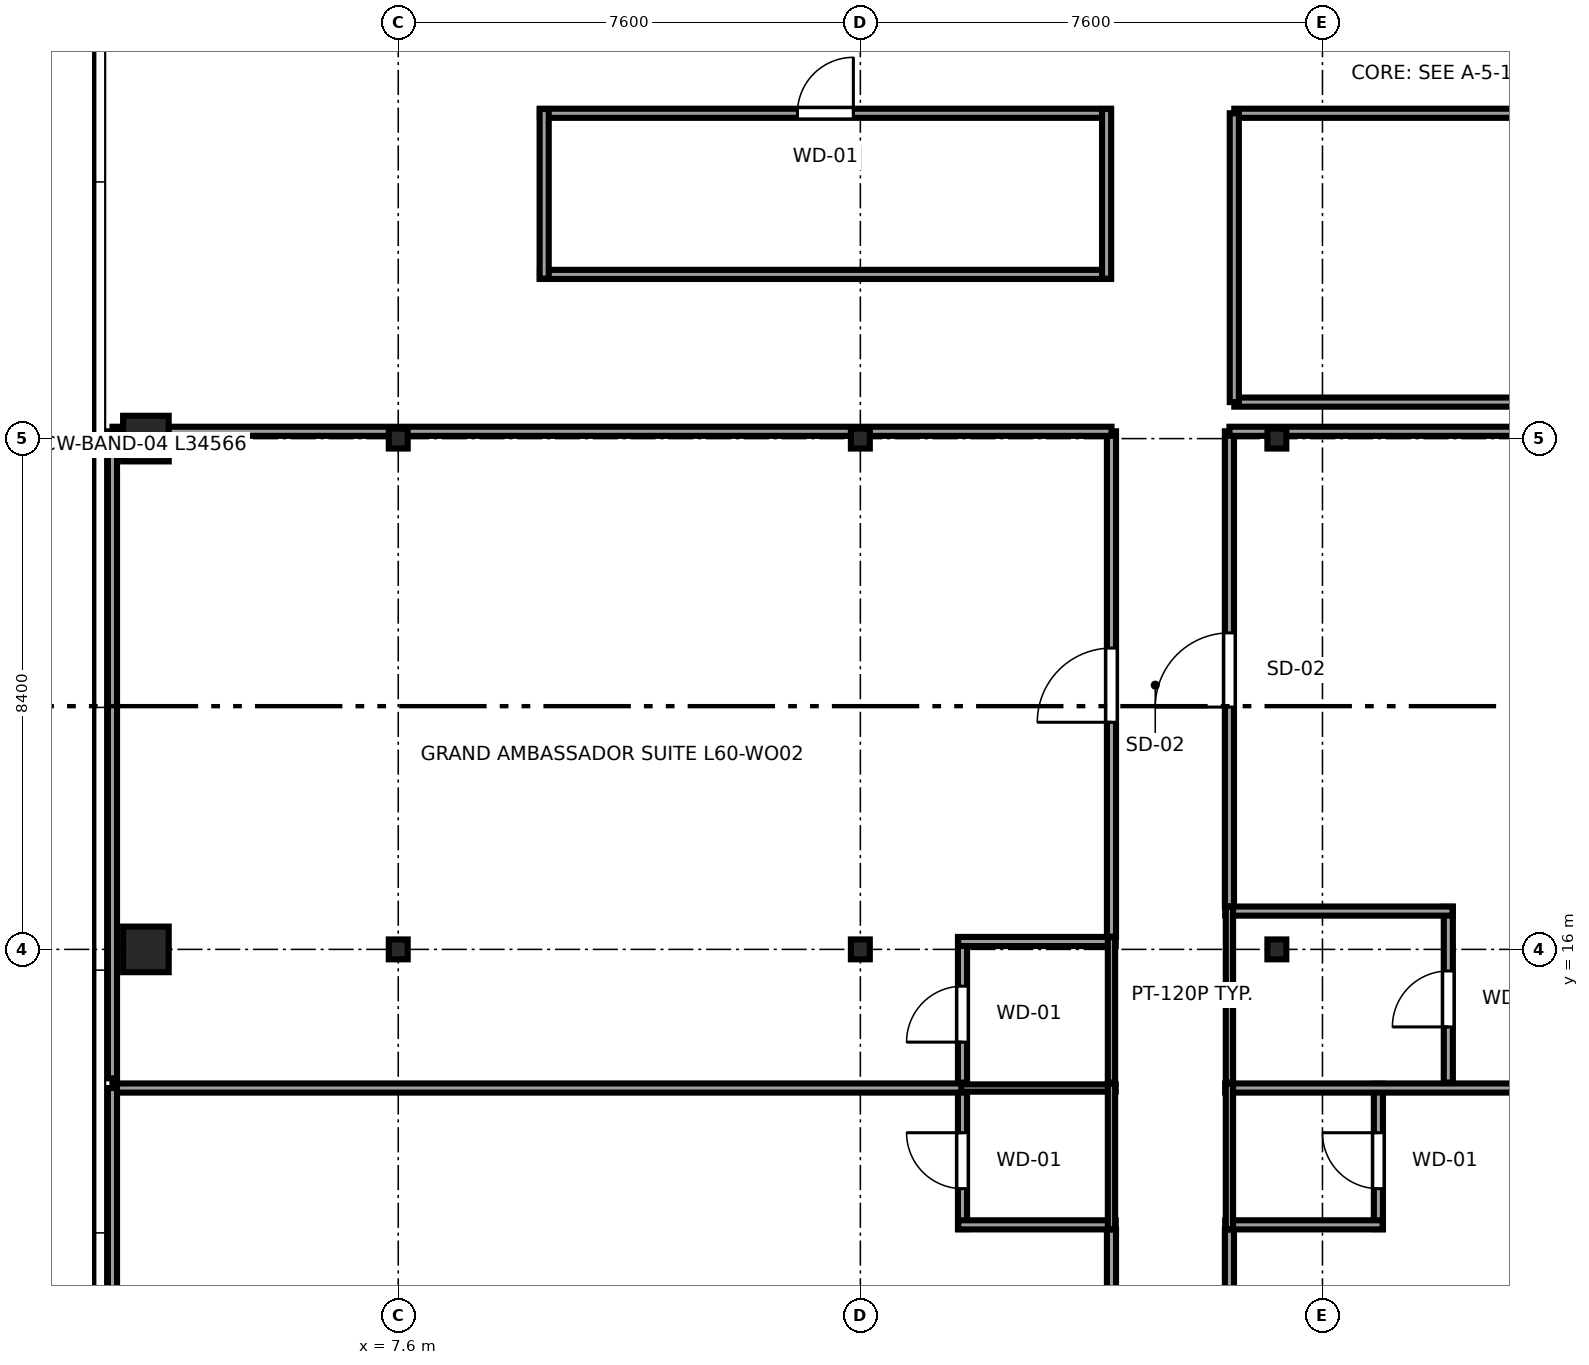
"""IFC4 building model, lengths in metres.
Left out: names, types, materials, properties, quantities, classifications, styles, units other than length and angle.
Written with IfcOpenShell. Run it as: python <this file> out.ifc"""

import sys

from ifc_helpers import new_model, si_unit, direction, frame, frame_2d, origin, origin_2d, place, context, subcontext, project, spatial, rectangle, i_section, extrude, source, transform, mapped, element, fill, save


model = new_model("IFC4")
c1 = context("Model", 3, precision=1e-05, world=origin(), true_north=direction((0.0, 1.0)))
c2 = subcontext(c1, "Body", "Model", "MODEL_VIEW")
j1 = project(units=[si_unit("LENGTHUNIT", "METRE"), si_unit("PLANEANGLEUNIT", "RADIAN")], contexts=[c1])
p1 = place(None, origin())
s1 = spatial("IfcSite", under=j1, at=p1, CompositionType="ELEMENT")
p2 = place(p1, origin())
s2 = spatial("IfcBuilding", under=s1, at=p2, CompositionType="ELEMENT")
p3 = place(p2, frame((0.0, 0.0, 227.45)))
s3 = spatial("IfcBuildingStorey", under=s2, at=p3, CompositionType="ELEMENT", Elevation=227.45)
m1 = source(origin(), c2, "Body", "SweptSolid", [
    extrude(rectangle(XDim=0.75, YDim=0.75, at=origin_2d()), origin(), (0.0, 0.0, 1.0), 3.55),
])
for number, where, z_axis, x_axis in (
    (1, (3.45, 16.0, 0.0), (0.0, 0.0, 1.0), (1.0, 0.0, 0.0)),
    (2, (3.45, 24.4, 0.0), (0.0, 0.0, 1.0), (1.0, 0.0, 0.0)),
):
    element("IfcColumn", number, at=place(p3, frame(where, z_axis=z_axis, x_axis=x_axis)), inside=s3, PredefinedType="COLUMN", context=c2, shape_type="MappedRepresentation", body=[
        mapped(m1, transform((0.0, 0.0, 0.0), x_axis=(1.0, 0.0, 0.0), y_axis=(0.0, 1.0, 0.0), z_axis=(0.0, 0.0, 1.0), scale=1.0)),
    ])
m2 = source(origin(), c2, "Body", "SweptSolid", [
    extrude(i_section(OverallWidth=0.311, OverallDepth=0.327, WebThickness=0.016, FlangeThickness=0.025, FilletRadius=0.017, at=origin_2d()), origin(), (0.0, 0.0, 1.0), 3.55),
])
for number, where, z_axis, x_axis in (
    (3, (7.6, 16.0, 0.0), (0.0, 0.0, 1.0), (1.0, 0.0, 0.0)),
    (4, (7.6, 24.4, 0.0), (0.0, 0.0, 1.0), (1.0, 0.0, 0.0)),
    (5, (15.2, 16.0, 0.0), (0.0, 0.0, 1.0), (1.0, 0.0, 0.0)),
    (6, (15.2, 24.4, 0.0), (0.0, 0.0, 1.0), (1.0, 0.0, 0.0)),
    (7, (22.05, 16.0, 0.0), (0.0, 0.0, 1.0), (1.0, 0.0, 0.0)),
    (8, (22.05, 24.4, 0.0), (0.0, 0.0, 1.0), (1.0, 0.0, 0.0)),
):
    element("IfcColumn", number, at=place(p3, frame(where, z_axis=z_axis, x_axis=x_axis)), inside=s3, PredefinedType="COLUMN", context=c2, shape_type="MappedRepresentation", body=[
        mapped(m2, transform((0.0, 0.0, 0.0), x_axis=(1.0, 0.0, 0.0), y_axis=(0.0, 1.0, 0.0), z_axis=(0.0, 0.0, 1.0), scale=1.0)),
    ])
p4 = place(p3, frame((16.88, 11.4, 0.0), z_axis=(0.0, 0.0, 1.0), x_axis=(0.0, 1.0, 0.0)))
e9 = element("IfcWall", 9, at=p4, inside=s3, PredefinedType="PARTITIONING", context=c2, shape_type="SweptSolid", body=[
    extrude(rectangle(XDim=2.39, YDim=0.15, at=frame_2d((1.195, 0.0))), origin(), (0.0, 0.0, 1.0), 3.37),
])
p5 = place(p4, frame((0.665, 0.0, 0.0)))
e10 = element("IfcOpeningElement", 10, at=p5, cuts=e9, PredefinedType="OPENING", context=c2, shape_type="SweptSolid", body=[
    extrude(rectangle(XDim=0.92, YDim=2.01, at=frame_2d((0.46, 1.005))), frame((0.0, 0.085, 0.0), z_axis=(0.0, -1.0, 0.0), x_axis=(1.0, 0.0, 0.0)), (0.0, 0.0, 1.0), 0.17),
])
p6 = place(p3, frame((16.81, 11.47, 0.0), z_axis=(0.0, 0.0, 1.0), x_axis=(1.0, 0.0, 0.0)))
e11 = element("IfcWall", 11, at=p6, inside=s3, PredefinedType="PARTITIONING", context=c2, shape_type="SweptSolid", body=[
    extrude(rectangle(XDim=2.59, YDim=0.15, at=frame_2d((1.295, 0.0))), origin(), (0.0, 0.0, 1.0), 3.37),
])
p7 = place(p3, frame((16.81, 13.72, 0.0), z_axis=(0.0, 0.0, 1.0), x_axis=(1.0, 0.0, 0.0)))
e12 = element("IfcWall", 12, at=p7, inside=s3, PredefinedType="PLUMBINGWALL", context=c2, shape_type="SweptSolid", body=[
    extrude(rectangle(XDim=2.59, YDim=0.12, at=frame_2d((1.295, 0.0))), origin(), (0.0, 0.0, 1.0), 3.37),
])
p8 = place(p3, frame((19.33, 11.4, 0.0), z_axis=(0.0, 0.0, 1.0), x_axis=(0.0, 1.0, 0.0)))
e13 = element("IfcWall", 13, at=p8, inside=s3, PredefinedType="PLUMBINGWALL", context=c2, shape_type="SweptSolid", body=[
    extrude(rectangle(XDim=2.39, YDim=0.12, at=frame_2d((1.195, 0.0))), origin(), (0.0, 0.0, 1.0), 3.37),
])
p9 = place(p3, frame((16.88, 13.81, 0.0), z_axis=(0.0, 0.0, 1.0), x_axis=(0.0, 1.0, 0.0)))
e14 = element("IfcWall", 14, at=p9, inside=s3, PredefinedType="PARTITIONING", context=c2, shape_type="SweptSolid", body=[
    extrude(rectangle(XDim=2.39, YDim=0.15, at=frame_2d((1.195, 0.0))), origin(), (0.0, 0.0, 1.0), 3.37),
])
p10 = place(p9, frame((0.665, 0.0, 0.0)))
e15 = element("IfcOpeningElement", 15, at=p10, cuts=e14, PredefinedType="OPENING", context=c2, shape_type="SweptSolid", body=[
    extrude(rectangle(XDim=0.92, YDim=2.01, at=frame_2d((0.46, 1.005))), frame((0.0, 0.085, 0.0), z_axis=(0.0, -1.0, 0.0), x_axis=(1.0, 0.0, 0.0)), (0.0, 0.0, 1.0), 0.17),
])
p11 = place(p3, frame((16.81, 16.13, 0.0), z_axis=(0.0, 0.0, 1.0), x_axis=(1.0, 0.0, 0.0)))
e16 = element("IfcWall", 16, at=p11, inside=s3, PredefinedType="PARTITIONING", context=c2, shape_type="SweptSolid", body=[
    extrude(rectangle(XDim=2.59, YDim=0.15, at=frame_2d((1.295, 0.0))), origin(), (0.0, 0.0, 1.0), 2.758),
])
p12 = place(p3, frame((19.33, 13.81, 0.0), z_axis=(0.0, 0.0, 1.0), x_axis=(0.0, 1.0, 0.0)))
e17 = element("IfcWall", 17, at=p12, inside=s3, PredefinedType="PLUMBINGWALL", context=c2, shape_type="SweptSolid", body=[
    extrude(rectangle(XDim=2.39, YDim=0.12, at=frame_2d((1.195, 0.0))), origin(), (0.0, 0.0, 1.0), 3.37),
])
p13 = place(p3, frame((23.72, 11.4, 0.0), z_axis=(0.0, 0.0, 1.0), x_axis=(0.0, 1.0, 0.0)))
e18 = element("IfcWall", 18, at=p13, inside=s3, PredefinedType="PARTITIONING", context=c2, shape_type="SweptSolid", body=[
    extrude(rectangle(XDim=2.39, YDim=0.15, at=frame_2d((1.195, 0.0))), origin(), (0.0, 0.0, 1.0), 3.37),
])
p14 = place(p13, frame((0.665, 0.0, 0.0)))
e19 = element("IfcOpeningElement", 19, at=p14, cuts=e18, PredefinedType="OPENING", context=c2, shape_type="SweptSolid", body=[
    extrude(rectangle(XDim=0.92, YDim=2.01, at=frame_2d((0.46, 1.005))), frame((0.0, 0.085, 0.0), z_axis=(0.0, -1.0, 0.0), x_axis=(1.0, 0.0, 0.0)), (0.0, 0.0, 1.0), 0.17),
])
p15 = place(p3, frame((21.2, 11.47, 0.0), z_axis=(0.0, 0.0, 1.0), x_axis=(1.0, 0.0, 0.0)))
e20 = element("IfcWall", 20, at=p15, inside=s3, PredefinedType="PARTITIONING", context=c2, shape_type="SweptSolid", body=[
    extrude(rectangle(XDim=2.59, YDim=0.15, at=frame_2d((1.295, 0.0))), origin(), (0.0, 0.0, 1.0), 3.37),
])
p16 = place(p3, frame((21.2, 13.72, 0.0), z_axis=(0.0, 0.0, 1.0), x_axis=(1.0, 0.0, 0.0)))
e21 = element("IfcWall", 21, at=p16, inside=s3, PredefinedType="PARTITIONING", context=c2, shape_type="SweptSolid", body=[
    extrude(rectangle(XDim=18.195, YDim=0.15, at=frame_2d((9.098, 0.0))), origin(), (0.0, 0.0, 1.0), 3.37),
])
p17 = place(p3, frame((21.27, 11.4, 0.0), z_axis=(0.0, 0.0, 1.0), x_axis=(0.0, 1.0, 0.0)))
e22 = element("IfcWall", 22, at=p17, inside=s3, PredefinedType="PLUMBINGWALL", context=c2, shape_type="SweptSolid", body=[
    extrude(rectangle(XDim=2.39, YDim=0.12, at=frame_2d((1.195, 0.0))), origin(), (0.0, 0.0, 1.0), 3.37),
])
p18 = place(p3, frame((24.87, 13.81, 0.0), z_axis=(0.0, 0.0, 1.0), x_axis=(0.0, 1.0, 0.0)))
e23 = element("IfcWall", 23, at=p18, inside=s3, PredefinedType="PARTITIONING", context=c2, shape_type="SweptSolid", body=[
    extrude(rectangle(XDim=2.89, YDim=0.15, at=frame_2d((1.445, 0.0))), origin(), (0.0, 0.0, 1.0), 3.37),
])
p19 = place(p18, frame((0.915, 0.0, 0.0)))
e24 = element("IfcOpeningElement", 24, at=p19, cuts=e23, PredefinedType="OPENING", context=c2, shape_type="SweptSolid", body=[
    extrude(rectangle(XDim=0.92, YDim=2.01, at=frame_2d((0.46, 1.005))), frame((0.0, 0.085, 0.0), z_axis=(0.0, -1.0, 0.0), x_axis=(1.0, 0.0, 0.0)), (0.0, 0.0, 1.0), 0.17),
])
p20 = place(p3, frame((21.2, 16.63, 0.0), z_axis=(0.0, 0.0, 1.0), x_axis=(1.0, 0.0, 0.0)))
e25 = element("IfcWall", 25, at=p20, inside=s3, PredefinedType="PARTITIONING", context=c2, shape_type="SweptSolid", body=[
    extrude(rectangle(XDim=3.74, YDim=0.15, at=frame_2d((1.87, 0.0))), origin(), (0.0, 0.0, 1.0), 3.37),
])
p21 = place(p3, frame((21.27, 13.81, 0.0), z_axis=(0.0, 0.0, 1.0), x_axis=(0.0, 1.0, 0.0)))
e26 = element("IfcWall", 26, at=p21, inside=s3, PredefinedType="PLUMBINGWALL", context=c2, shape_type="SweptSolid", body=[
    extrude(rectangle(XDim=2.89, YDim=0.12, at=frame_2d((1.445, 0.0))), origin(), (0.0, 0.0, 1.0), 3.37),
])
p22 = place(p3, frame((19.33, 3.005, 0.0), z_axis=(0.0, 0.0, 1.0), x_axis=(0.0, 1.0, 0.0)))
e27 = element("IfcWall", 27, at=p22, inside=s3, PredefinedType="PARTITIONING", context=c2, shape_type="SweptSolid", body=[
    extrude(rectangle(XDim=8.385, YDim=0.15, at=frame_2d((4.192, 0.0))), origin(), (0.0, 0.0, 1.0), 3.37),
])
p23 = place(p22, frame((3.59, 0.0, 0.0)))
e28 = element("IfcOpeningElement", 28, at=p23, cuts=e27, PredefinedType="OPENING", context=c2, shape_type="SweptSolid", body=[
    extrude(rectangle(XDim=1.22, YDim=2.08, at=frame_2d((0.61, 1.04))), frame((0.0, 0.085, 0.0), z_axis=(0.0, -1.0, 0.0), x_axis=(1.0, 0.0, 0.0)), (0.0, 0.0, 1.0), 0.17),
])
p24 = place(p3, frame((2.9, 13.72, 0.0), z_axis=(0.0, 0.0, 1.0), x_axis=(1.0, 0.0, 0.0)))
e29 = element("IfcWall", 29, at=p24, inside=s3, PredefinedType="PARTITIONING", context=c2, shape_type="SweptSolid", body=[
    extrude(rectangle(XDim=13.96, YDim=0.15, at=frame_2d((6.98, 0.0))), origin(), (0.0, 0.0, 1.0), 3.37),
])
p25 = place(p3, frame((2.9, 7.042, 0.0), z_axis=(0.0, 0.0, 1.0), x_axis=(0.0, 1.0, 0.0)))
e30 = element("IfcWall", 30, at=p25, inside=s3, PredefinedType="PARTITIONING", context=c2, shape_type="SweptSolid", body=[
    extrude(rectangle(XDim=6.678, YDim=0.15, at=frame_2d((3.339, 0.0))), origin(), (0.0, 0.0, 1.0), 3.37),
])
p26 = place(p3, frame((19.33, 16.21, 0.0), z_axis=(0.0, 0.0, 1.0), x_axis=(0.0, 1.0, 0.0)))
e31 = element("IfcWall", 31, at=p26, inside=s3, PredefinedType="PARTITIONING", context=c2, shape_type="SweptSolid", body=[
    extrude(rectangle(XDim=8.31, YDim=0.15, at=frame_2d((4.155, 0.0))), origin(), (0.0, 0.0, 1.0), 3.37),
])
p27 = place(p26, frame((3.525, 0.0, 0.0)))
e32 = element("IfcOpeningElement", 32, at=p27, cuts=e31, PredefinedType="OPENING", context=c2, shape_type="SweptSolid", body=[
    extrude(rectangle(XDim=1.22, YDim=2.08, at=frame_2d((0.61, 1.04))), frame((0.0, 0.085, 0.0), z_axis=(0.0, -1.0, 0.0), x_axis=(1.0, 0.0, 0.0)), (0.0, 0.0, 1.0), 0.17),
])
p28 = place(p3, frame((2.9, 24.52, 0.0), z_axis=(0.0, 0.0, 1.0), x_axis=(1.0, 0.0, 0.0)))
e33 = element("IfcWall", 33, at=p28, inside=s3, PredefinedType="PARTITIONING", context=c2, shape_type="SweptSolid", body=[
    extrude(rectangle(XDim=16.43, YDim=0.15, at=frame_2d((8.215, 0.0))), origin(), (0.0, 0.0, 1.0), 2.758),
])
p29 = place(p3, frame((2.9, 13.88, 0.0), z_axis=(0.0, 0.0, 1.0), x_axis=(0.0, 1.0, 0.0)))
e34 = element("IfcWall", 34, at=p29, inside=s3, PredefinedType="PARTITIONING", context=c2, shape_type="SweptSolid", body=[
    extrude(rectangle(XDim=10.64, YDim=0.15, at=frame_2d((5.32, 0.0))), origin(), (0.0, 0.0, 1.0), 3.37),
])
p30 = place(p3, frame((21.27, 3.005, 0.0), z_axis=(0.0, 0.0, 1.0), x_axis=(0.0, 1.0, 0.0)))
e35 = element("IfcWall", 35, at=p30, inside=s3, PredefinedType="PARTITIONING", context=c2, shape_type="SweptSolid", body=[
    extrude(rectangle(XDim=8.385, YDim=0.15, at=frame_2d((4.192, 0.0))), origin(), (0.0, 0.0, 1.0), 3.37),
])
p31 = place(p30, frame((2.64, 0.0, 0.0)))
e36 = element("IfcOpeningElement", 36, at=p31, cuts=e35, PredefinedType="OPENING", context=c2, shape_type="SweptSolid", body=[
    extrude(rectangle(XDim=1.22, YDim=2.08, at=frame_2d((0.61, 1.04))), frame((0.0, 0.085, 0.0), z_axis=(0.0, -1.0, 0.0), x_axis=(1.0, 0.0, 0.0)), (0.0, 0.0, 1.0), 0.17),
])
p32 = place(p3, frame((21.27, 16.71, 0.0), z_axis=(0.0, 0.0, 1.0), x_axis=(0.0, 1.0, 0.0)))
e37 = element("IfcWall", 37, at=p32, inside=s3, PredefinedType="PARTITIONING", context=c2, shape_type="SweptSolid", body=[
    extrude(rectangle(XDim=7.81, YDim=0.15, at=frame_2d((3.905, 0.0))), origin(), (0.0, 0.0, 1.0), 3.37),
])
p33 = place(p32, frame((3.275, 0.0, 0.0)))
e38 = element("IfcOpeningElement", 38, at=p33, cuts=e37, PredefinedType="OPENING", context=c2, shape_type="SweptSolid", body=[
    extrude(rectangle(XDim=1.22, YDim=2.08, at=frame_2d((0.61, 1.04))), frame((0.0, 0.085, 0.0), z_axis=(0.0, -1.0, 0.0), x_axis=(1.0, 0.0, 0.0)), (0.0, 0.0, 1.0), 0.17),
])
p34 = place(p3, frame((21.27, 24.52, 0.0), z_axis=(0.0, 0.0, 1.0), x_axis=(1.0, 0.0, 0.0)))
e39 = element("IfcWall", 39, at=p34, inside=s3, PredefinedType="PARTITIONING", context=c2, shape_type="SweptSolid", body=[
    extrude(rectangle(XDim=18.125, YDim=0.15, at=frame_2d((9.062, 0.0))), origin(), (0.0, 0.0, 1.0), 2.758),
])
p35 = place(p3, frame((9.93, 27.1, 0.0), z_axis=(0.0, 0.0, 1.0), x_axis=(1.0, 0.0, 0.0)))
e40 = element("IfcWall", 40, at=p35, inside=s3, PredefinedType="PARTITIONING", context=c2, shape_type="SweptSolid", body=[
    extrude(rectangle(XDim=9.39, YDim=0.15, at=frame_2d((4.695, 0.0))), origin(), (0.0, 0.0, 1.0), 3.37),
])
p36 = place(p3, frame((9.93, 29.75, 0.0), z_axis=(0.0, 0.0, 1.0), x_axis=(1.0, 0.0, 0.0)))
e41 = element("IfcWall", 41, at=p36, inside=s3, PredefinedType="PARTITIONING", context=c2, shape_type="SweptSolid", body=[
    extrude(rectangle(XDim=9.39, YDim=0.15, at=frame_2d((4.695, 0.0))), origin(), (0.0, 0.0, 1.0), 3.37),
])
p37 = place(p36, frame((4.235, 0.0, 0.0)))
e42 = element("IfcOpeningElement", 42, at=p37, cuts=e41, PredefinedType="OPENING", context=c2, shape_type="SweptSolid", body=[
    extrude(rectangle(XDim=0.92, YDim=2.01, at=frame_2d((0.46, 1.005))), frame((0.0, 0.085, 0.0), z_axis=(0.0, -1.0, 0.0), x_axis=(1.0, 0.0, 0.0)), (0.0, 0.0, 1.0), 0.17),
])
for number, where, z_axis, x_axis in (
    (43, (10.0, 27.03, 0.0), (0.0, 0.0, 1.0), (0.0, 1.0, 0.0)),
    (44, (19.25, 27.03, 0.0), (0.0, 0.0, 1.0), (0.0, 1.0, 0.0)),
):
    element("IfcWall", number, at=place(p3, frame(where, z_axis=z_axis, x_axis=x_axis)), inside=s3, PredefinedType="PARTITIONING", context=c2, shape_type="SweptSolid", body=[
        extrude(rectangle(XDim=2.79, YDim=0.15, at=frame_2d((1.395, 0.0))), origin(), (0.0, 0.0, 1.0), 3.37),
    ])
p38 = place(p3, frame((21.35, 25.0, 0.0), z_axis=(0.0, 0.0, 1.0), x_axis=(1.0, 0.0, 0.0)))
e45 = element("IfcWall", 45, at=p38, inside=s3, PredefinedType="PARTITIONING", context=c2, shape_type="SweptSolid", body=[
    extrude(rectangle(XDim=14.45, YDim=0.15, at=frame_2d((7.225, 0.0))), origin(), (0.0, 0.0, 1.0), 3.37),
])
p39 = place(p3, frame((21.35, 29.75, 0.0), z_axis=(0.0, 0.0, 1.0), x_axis=(1.0, 0.0, 0.0)))
e46 = element("IfcWall", 46, at=p39, inside=s3, PredefinedType="PARTITIONING", context=c2, shape_type="SweptSolid", body=[
    extrude(rectangle(XDim=14.45, YDim=0.15, at=frame_2d((7.225, 0.0))), origin(), (0.0, 0.0, 1.0), 3.37),
])
p40 = place(p39, frame((6.4, 0.0, 0.0)))
e47 = element("IfcOpeningElement", 47, at=p40, cuts=e46, PredefinedType="OPENING", context=c2, shape_type="SweptSolid", body=[
    extrude(rectangle(XDim=1.65, YDim=2.15, at=frame_2d((0.825, 1.075))), frame((0.0, 0.085, 0.0), z_axis=(0.0, -1.0, 0.0), x_axis=(1.0, 0.0, 0.0)), (0.0, 0.0, 1.0), 0.17),
])
p41 = place(p3, frame((21.35, 25.0, 0.0), z_axis=(0.0, 0.0, 1.0), x_axis=(0.0, 1.0, 0.0)))
e48 = element("IfcWall", 48, at=p41, inside=s3, PredefinedType="PARTITIONING", context=c2, shape_type="SweptSolid", body=[
    extrude(rectangle(XDim=4.75, YDim=0.15, at=frame_2d((2.375, 0.0))), origin(), (0.0, 0.0, 1.0), 3.37),
])
m3 = source(origin(), c2, "Body", "SweptSolid", [
    extrude(rectangle(XDim=0.92, YDim=2.01, at=frame_2d((0.46, 1.005))), frame((0.0, 0.025, 0.0), z_axis=(0.0, -1.0, 0.0), x_axis=(1.0, 0.0, 0.0)), (0.0, 0.0, 1.0), 0.05),
])
p42 = place(p5, origin())
e49 = element("IfcDoor", 49, at=p42, inside=s3, OperationType="SINGLE_SWING_RIGHT", PredefinedType="DOOR", context=c2, shape_type="MappedRepresentation", body=[
    mapped(m3, transform((0.0, 0.0, 0.0), x_axis=(1.0, 0.0, 0.0), y_axis=(0.0, 1.0, 0.0), z_axis=(0.0, 0.0, 1.0), scale=1.0)),
])
fill(e10, e49)
p43 = place(p10, origin())
e50 = element("IfcDoor", 50, at=p43, inside=s3, OperationType="SINGLE_SWING_LEFT", PredefinedType="DOOR", context=c2, shape_type="MappedRepresentation", body=[
    mapped(m3, transform((0.0, 0.0, 0.0), x_axis=(1.0, 0.0, 0.0), y_axis=(0.0, 1.0, 0.0), z_axis=(0.0, 0.0, 1.0), scale=1.0)),
])
fill(e15, e50)
p44 = place(p14, origin())
e51 = element("IfcDoor", 51, at=p44, inside=s3, OperationType="SINGLE_SWING_RIGHT", PredefinedType="DOOR", context=c2, shape_type="MappedRepresentation", body=[
    mapped(m3, transform((0.0, 0.0, 0.0), x_axis=(1.0, 0.0, 0.0), y_axis=(0.0, 1.0, 0.0), z_axis=(0.0, 0.0, 1.0), scale=1.0)),
])
fill(e19, e51)
p45 = place(p19, origin())
e52 = element("IfcDoor", 52, at=p45, inside=s3, OperationType="SINGLE_SWING_LEFT", PredefinedType="DOOR", context=c2, shape_type="MappedRepresentation", body=[
    mapped(m3, transform((0.0, 0.0, 0.0), x_axis=(1.0, 0.0, 0.0), y_axis=(0.0, 1.0, 0.0), z_axis=(0.0, 0.0, 1.0), scale=1.0)),
])
fill(e24, e52)
m4 = source(origin(), c2, "Body", "SweptSolid", [
    extrude(rectangle(XDim=1.22, YDim=2.08, at=frame_2d((0.61, 1.04))), frame((0.0, 0.025, 0.0), z_axis=(0.0, -1.0, 0.0), x_axis=(1.0, 0.0, 0.0)), (0.0, 0.0, 1.0), 0.05),
])
p46 = place(p27, origin())
e53 = element("IfcDoor", 53, at=p46, inside=s3, OperationType="SINGLE_SWING_LEFT", PredefinedType="DOOR", context=c2, shape_type="MappedRepresentation", body=[
    mapped(m4, transform((0.0, 0.0, 0.0), x_axis=(1.0, 0.0, 0.0), y_axis=(0.0, 1.0, 0.0), z_axis=(0.0, 0.0, 1.0), scale=1.0)),
])
fill(e32, e53)
p47 = place(p33, origin())
e54 = element("IfcDoor", 54, at=p47, inside=s3, OperationType="SINGLE_SWING_LEFT", PredefinedType="DOOR", context=c2, shape_type="MappedRepresentation", body=[
    mapped(m4, transform((0.0, 0.0, 0.0), x_axis=(1.0, 0.0, 0.0), y_axis=(0.0, 1.0, 0.0), z_axis=(0.0, 0.0, 1.0), scale=1.0)),
])
fill(e38, e54)
p48 = place(p37, origin())
e55 = element("IfcDoor", 55, at=p48, inside=s3, OperationType="SINGLE_SWING_RIGHT", PredefinedType="DOOR", context=c2, shape_type="MappedRepresentation", body=[
    mapped(m3, transform((0.0, 0.0, 0.0), x_axis=(1.0, 0.0, 0.0), y_axis=(0.0, 1.0, 0.0), z_axis=(0.0, 0.0, 1.0), scale=1.0)),
])
fill(e42, e55)
save(model, sys.argv[1])
